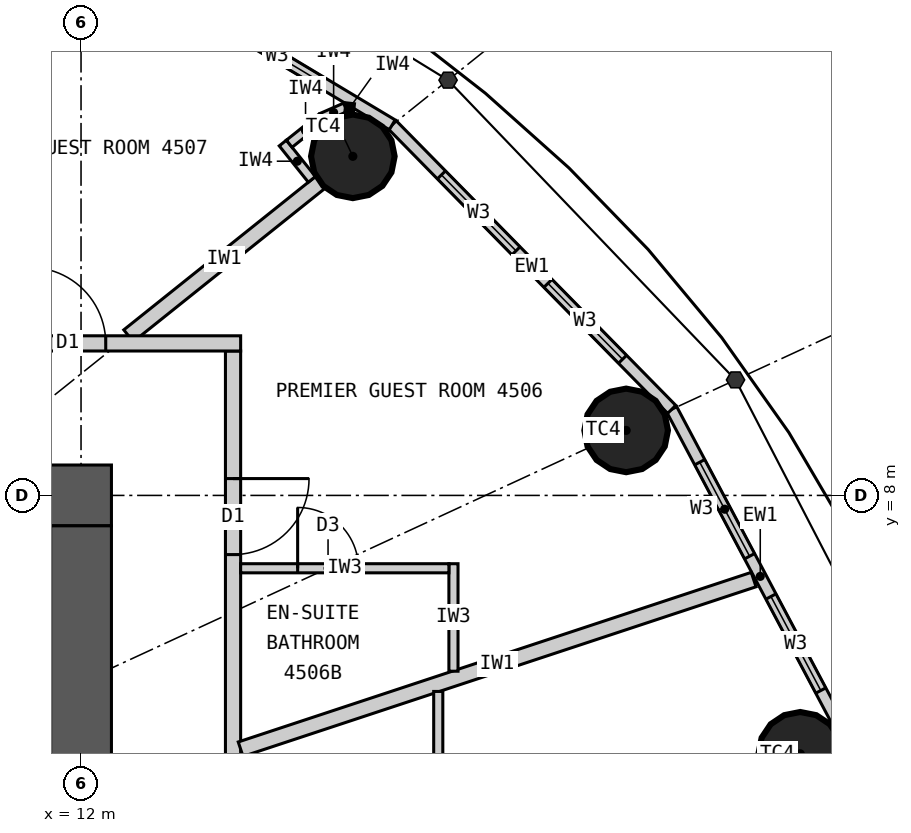
"""IFC4 building model, lengths in metres.
Left out: names, types, materials, properties, quantities, classifications, styles, units other than length and angle.
Written with IfcOpenShell. Run it as: python <this file> out.ifc"""

import sys

from ifc_helpers import new_model, si_unit, direction, frame, frame_2d, origin, origin_2d, place, context, subcontext, project, spatial, rectangle, circle, extrude, element, fill, save


model = new_model("IFC4")
c1 = context("Model", 3, precision=1e-05, world=origin(), true_north=direction((0.0, 1.0)))
c2 = subcontext(c1, "Body", "Model", "MODEL_VIEW")
j1 = project(units=[si_unit("LENGTHUNIT", "METRE"), si_unit("PLANEANGLEUNIT", "RADIAN")], contexts=[c1])
p1 = place(None, origin())
s1 = spatial("IfcSite", under=j1, at=p1, CompositionType="ELEMENT")
p2 = place(p1, origin())
s2 = spatial("IfcBuilding", under=s1, at=p2, CompositionType="ELEMENT")
p3 = place(p2, frame((0.0, 0.0, 169.8)))
s3 = spatial("IfcBuildingStorey", under=s2, at=p3, CompositionType="ELEMENT", Elevation=169.8)
for number, where, z_axis, x_axis in (
    (1, (21.463, 4.601, 0.0), (0.0, 0.0, 1.0), (1.0, 0.0, 0.0)),
    (2, (19.172, 8.855, 0.0), (0.0, 0.0, 1.0), (1.0, 0.0, 0.0)),
    (3, (15.576, 12.461, 0.0), (0.0, 0.0, 1.0), (1.0, 0.0, 0.0)),
):
    element("IfcColumn", number, at=place(p3, frame(where, z_axis=z_axis, x_axis=x_axis)), inside=s3, PredefinedType="COLUMN", context=c2, shape_type="SweptSolid", body=[
        extrude(circle(Radius=0.55, at=origin_2d()), origin(), (0.0, 0.0, 1.0), 3.3),
    ])
p4 = place(p3, frame((-12.4, 8.0, 0.0), z_axis=(0.0, 0.0, 1.0), x_axis=(1.0, 0.0, 0.0)))
e4 = element("IfcWall", 4, at=p4, inside=s3, PredefinedType="SHEAR", context=c2, shape_type="SweptSolid", body=[
    extrude(rectangle(XDim=24.8, YDim=0.8, at=frame_2d((12.4, 0.0))), origin(), (0.0, 0.0, 1.0), 3.3),
])
p5 = place(p4, frame((11.1, 0.0, 0.0)))
e5 = element("IfcOpeningElement", 5, at=p5, cuts=e4, PredefinedType="OPENING", context=c2, shape_type="SweptSolid", body=[
    extrude(rectangle(XDim=1.2, YDim=2.2, at=frame_2d((0.6, 1.1))), frame((0.0, 0.41, 0.0), z_axis=(0.0, -1.0, 0.0), x_axis=(1.0, 0.0, 0.0)), (0.0, 0.0, 1.0), 0.82),
])
p6 = place(p4, frame((18.7, 0.0, 0.0)))
e6 = element("IfcOpeningElement", 6, at=p6, cuts=e4, PredefinedType="OPENING", context=c2, shape_type="SweptSolid", body=[
    extrude(rectangle(XDim=0.9, YDim=2.2, at=frame_2d((0.45, 1.1))), frame((0.0, 0.41, 0.0), z_axis=(0.0, -1.0, 0.0), x_axis=(1.0, 0.0, 0.0)), (0.0, 0.0, 1.0), 0.82),
])
p7 = place(p3, frame((12.0, -7.6, 0.0), z_axis=(0.0, 0.0, 1.0), x_axis=(0.0, 1.0, 0.0)))
e7 = element("IfcWall", 7, at=p7, inside=s3, PredefinedType="SHEAR", context=c2, shape_type="SweptSolid", body=[
    extrude(rectangle(XDim=15.2, YDim=0.8, at=frame_2d((7.6, 0.0))), origin(), (0.0, 0.0, 1.0), 3.3),
])
p8 = place(p7, frame((6.7, 0.0, 0.0)))
e8 = element("IfcOpeningElement", 8, at=p8, cuts=e7, PredefinedType="OPENING", context=c2, shape_type="SweptSolid", body=[
    extrude(rectangle(XDim=1.8, YDim=2.2, at=frame_2d((0.9, 1.1))), frame((0.0, 0.41, 0.0), z_axis=(0.0, -1.0, 0.0), x_axis=(1.0, 0.0, 0.0)), (0.0, 0.0, 1.0), 0.82),
])
p9 = place(p3, frame((22.102, 4.738, 0.0), z_axis=(0.0, 0.0, 1.0), x_axis=(-0.468428906714, 0.883501193748, 0.0)))
e9 = element("IfcWall", 9, at=p9, inside=s3, PredefinedType="ELEMENTEDWALL", context=c2, shape_type="SweptSolid", body=[
    extrude(rectangle(XDim=4.974, YDim=0.15, at=frame_2d((2.487, 0.0))), origin(), (0.0, 0.0, 1.0), 3.12),
])
p10 = place(p9, frame((0.787, 0.0, 0.9)))
e10 = element("IfcOpeningElement", 10, at=p10, cuts=e9, PredefinedType="OPENING", context=c2, shape_type="SweptSolid", body=[
    extrude(rectangle(XDim=1.4, YDim=1.9, at=frame_2d((0.7, 0.95))), frame((0.0, 0.085, 0.0), z_axis=(0.0, -1.0, 0.0), x_axis=(1.0, 0.0, 0.0)), (0.0, 0.0, 1.0), 0.17),
])
p11 = place(p9, frame((2.787, 0.0, 0.9)))
e11 = element("IfcOpeningElement", 11, at=p11, cuts=e9, PredefinedType="OPENING", context=c2, shape_type="SweptSolid", body=[
    extrude(rectangle(XDim=1.4, YDim=1.9, at=frame_2d((0.7, 0.95))), frame((0.0, 0.085, 0.0), z_axis=(0.0, -1.0, 0.0), x_axis=(1.0, 0.0, 0.0)), (0.0, 0.0, 1.0), 0.17),
])
p12 = place(p3, frame((19.772, 9.132, 0.0), z_axis=(0.0, 0.0, 1.0), x_axis=(-0.700727467776, 0.71342905457, 0.0)))
e12 = element("IfcWall", 12, at=p12, inside=s3, PredefinedType="ELEMENTEDWALL", context=c2, shape_type="SweptSolid", body=[
    extrude(rectangle(XDim=5.247, YDim=0.15, at=frame_2d((2.624, 0.0))), origin(), (0.0, 0.0, 1.0), 3.12),
])
p13 = place(p12, frame((0.924, 0.0, 0.9)))
e13 = element("IfcOpeningElement", 13, at=p13, cuts=e12, PredefinedType="OPENING", context=c2, shape_type="SweptSolid", body=[
    extrude(rectangle(XDim=1.4, YDim=1.9, at=frame_2d((0.7, 0.95))), frame((0.0, 0.085, 0.0), z_axis=(0.0, -1.0, 0.0), x_axis=(1.0, 0.0, 0.0)), (0.0, 0.0, 1.0), 0.17),
])
p14 = place(p12, frame((2.924, 0.0, 0.9)))
e14 = element("IfcOpeningElement", 14, at=p14, cuts=e12, PredefinedType="OPENING", context=c2, shape_type="SweptSolid", body=[
    extrude(rectangle(XDim=1.4, YDim=1.9, at=frame_2d((0.7, 0.95))), frame((0.0, 0.085, 0.0), z_axis=(0.0, -1.0, 0.0), x_axis=(1.0, 0.0, 0.0)), (0.0, 0.0, 1.0), 0.17),
])
p15 = place(p3, frame((16.095, 12.876, 0.0), z_axis=(0.0, 0.0, 1.0), x_axis=(-0.857695199231, 0.514158482587, 0.0)))
e15 = element("IfcWall", 15, at=p15, inside=s3, PredefinedType="ELEMENTEDWALL", context=c2, shape_type="SweptSolid", body=[
    extrude(rectangle(XDim=5.536, YDim=0.15, at=frame_2d((2.768, 0.0))), origin(), (0.0, 0.0, 1.0), 3.12),
])
p16 = place(p15, frame((1.068, 0.0, 0.9)))
e16 = element("IfcOpeningElement", 16, at=p16, cuts=e15, PredefinedType="OPENING", context=c2, shape_type="SweptSolid", body=[
    extrude(rectangle(XDim=1.4, YDim=1.9, at=frame_2d((0.7, 0.95))), frame((0.0, 0.085, 0.0), z_axis=(0.0, -1.0, 0.0), x_axis=(1.0, 0.0, 0.0)), (0.0, 0.0, 1.0), 0.17),
])
p17 = place(p15, frame((3.068, 0.0, 0.9)))
e17 = element("IfcOpeningElement", 17, at=p17, cuts=e15, PredefinedType="OPENING", context=c2, shape_type="SweptSolid", body=[
    extrude(rectangle(XDim=1.4, YDim=1.9, at=frame_2d((0.7, 0.95))), frame((0.0, 0.085, 0.0), z_axis=(0.0, -1.0, 0.0), x_axis=(1.0, 0.0, 0.0)), (0.0, 0.0, 1.0), 0.17),
])
p18 = place(p3, frame((14.0, -9.9, 0.0), z_axis=(0.0, 0.0, 1.0), x_axis=(0.0, 1.0, 0.0)))
e18 = element("IfcWall", 18, at=p18, inside=s3, PredefinedType="PARTITIONING", context=c2, shape_type="SweptSolid", body=[
    extrude(rectangle(XDim=19.8, YDim=0.2, at=frame_2d((9.9, 0.0))), origin(), (0.0, 0.0, 1.0), 3.12),
])
p19 = place(p18, frame((3.688, 0.0, 0.0)))
e19 = element("IfcOpeningElement", 19, at=p19, cuts=e18, PredefinedType="OPENING", context=c2, shape_type="SweptSolid", body=[
    extrude(rectangle(XDim=1.0, YDim=2.2, at=frame_2d((0.5, 1.1))), frame((0.0, 0.11, 0.0), z_axis=(0.0, -1.0, 0.0), x_axis=(1.0, 0.0, 0.0)), (0.0, 0.0, 1.0), 0.22),
])
p20 = place(p18, frame((9.979, 0.0, 0.0)))
e20 = element("IfcOpeningElement", 20, at=p20, cuts=e18, PredefinedType="OPENING", context=c2, shape_type="SweptSolid", body=[
    extrude(rectangle(XDim=1.0, YDim=2.2, at=frame_2d((0.5, 1.1))), frame((0.0, 0.11, 0.0), z_axis=(0.0, -1.0, 0.0), x_axis=(1.0, 0.0, 0.0)), (0.0, 0.0, 1.0), 0.22),
])
p21 = place(p18, frame((17.122, 0.0, 0.0)))
e21 = element("IfcOpeningElement", 21, at=p21, cuts=e18, PredefinedType="OPENING", context=c2, shape_type="SweptSolid", body=[
    extrude(rectangle(XDim=1.0, YDim=2.2, at=frame_2d((0.5, 1.1))), frame((0.0, 0.11, 0.0), z_axis=(0.0, -1.0, 0.0), x_axis=(1.0, 0.0, 0.0)), (0.0, 0.0, 1.0), 0.22),
])
p22 = place(p3, frame((14.1, 4.661, 0.0), z_axis=(0.0, 0.0, 1.0), x_axis=(0.949453216399, 0.313908569285, 0.0)))
e22 = element("IfcWall", 22, at=p22, inside=s3, PredefinedType="PARTITIONING", context=c2, shape_type="SweptSolid", body=[
    extrude(rectangle(XDim=7.109, YDim=0.2, at=frame_2d((3.554, 0.0))), origin(), (0.0, 0.0, 1.0), 3.12),
])
p23 = place(p3, frame((12.625, 10.1, 0.0), z_axis=(0.0, 0.0, 1.0), x_axis=(0.780876185034, 0.624685827954, 0.0)))
e23 = element("IfcWall", 23, at=p23, inside=s3, PredefinedType="PARTITIONING", context=c2, shape_type="SweptSolid", body=[
    extrude(rectangle(XDim=3.229, YDim=0.2, at=frame_2d((1.615, 0.0))), origin(), (0.0, 0.0, 1.0), 2.42),
])
p24 = place(p3, frame((16.7, 5.421, 0.0), z_axis=(0.0, 0.0, 1.0), x_axis=(0.0, -1.0, 0.0)))
e24 = element("IfcWall", 24, at=p24, inside=s3, PredefinedType="PARTITIONING", context=c2, shape_type="SweptSolid", body=[
    extrude(rectangle(XDim=3.2, YDim=0.12, at=frame_2d((1.6, 0.0))), origin(), (0.0, 0.0, 1.0), 3.12),
])
p25 = place(p24, frame((1.2, 0.0, 0.0)))
e25 = element("IfcOpeningElement", 25, at=p25, cuts=e24, PredefinedType="OPENING", context=c2, shape_type="SweptSolid", body=[
    extrude(rectangle(XDim=0.8, YDim=2.1, at=frame_2d((0.4, 1.05))), frame((0.0, 0.07, 0.0), z_axis=(0.0, -1.0, 0.0), x_axis=(1.0, 0.0, 0.0)), (0.0, 0.0, 1.0), 0.14),
])
p26 = place(p3, frame((16.9, 5.687, 0.0), z_axis=(0.0, 0.0, 1.0), x_axis=(0.0, 1.0, 0.0)))
e26 = element("IfcWall", 26, at=p26, inside=s3, PredefinedType="PARTITIONING", context=c2, shape_type="SweptSolid", body=[
    extrude(rectangle(XDim=1.414, YDim=0.12, at=frame_2d((0.707, 0.0))), origin(), (0.0, 0.0, 1.0), 3.12),
])
p27 = place(p3, frame((14.1, 7.042, 0.0), z_axis=(0.0, 0.0, 1.0), x_axis=(1.0, 0.0, 0.0)))
e27 = element("IfcWall", 27, at=p27, inside=s3, PredefinedType="PARTITIONING", context=c2, shape_type="SweptSolid", body=[
    extrude(rectangle(XDim=2.74, YDim=0.12, at=frame_2d((1.37, 0.0))), origin(), (0.0, 0.0, 1.0), 3.12),
])
p28 = place(p27, frame((0.75, 0.0, 0.0)))
e28 = element("IfcOpeningElement", 28, at=p28, cuts=e27, PredefinedType="OPENING", context=c2, shape_type="SweptSolid", body=[
    extrude(rectangle(XDim=0.8, YDim=2.1, at=frame_2d((0.4, 1.05))), frame((0.0, 0.07, 0.0), z_axis=(0.0, -1.0, 0.0), x_axis=(1.0, 0.0, 0.0)), (0.0, 0.0, 1.0), 0.14),
])
p29 = place(p3, frame((1.67, 10.0, 0.0), z_axis=(0.0, 0.0, 1.0), x_axis=(1.0, 0.0, 0.0)))
e29 = element("IfcWall", 29, at=p29, inside=s3, PredefinedType="PARTITIONING", context=c2, shape_type="SweptSolid", body=[
    extrude(rectangle(XDim=12.43, YDim=0.2, at=frame_2d((6.215, 0.0))), origin(), (0.0, 0.0, 1.0), 3.12),
])
p30 = place(p29, frame((9.655, 0.0, 0.0)))
e30 = element("IfcOpeningElement", 30, at=p30, cuts=e29, PredefinedType="OPENING", context=c2, shape_type="SweptSolid", body=[
    extrude(rectangle(XDim=1.0, YDim=2.2, at=frame_2d((0.5, 1.1))), frame((0.0, 0.11, 0.0), z_axis=(0.0, -1.0, 0.0), x_axis=(1.0, 0.0, 0.0)), (0.0, 0.0, 1.0), 0.22),
])
p31 = place(p3, frame((15.037, 12.158, 0.0), z_axis=(0.0, 0.0, 1.0), x_axis=(-0.624840920722, 0.78075208856, 0.0)))
e31 = element("IfcWall", 31, at=p31, inside=s3, PredefinedType="PARTITIONING", context=c2, shape_type="SweptSolid", body=[
    extrude(rectangle(XDim=0.612, YDim=0.12, at=frame_2d((0.306, 0.0))), origin(), (0.0, 0.0, 1.0), 3.12),
])
p32 = place(p3, frame((14.739, 12.627, 0.0), z_axis=(0.0, 0.0, 1.0), x_axis=(0.780912119987, 0.624640905527, 0.0)))
e32 = element("IfcWall", 32, at=p32, inside=s3, PredefinedType="PARTITIONING", context=c2, shape_type="SweptSolid", body=[
    extrude(rectangle(XDim=0.55, YDim=0.12, at=frame_2d((0.275, 0.0))), origin(), (0.0, 0.0, 1.0), 3.12),
])
p33 = place(p3, frame((15.169, 12.97, 0.0), z_axis=(0.0, 0.0, 1.0), x_axis=(0.915974725257, 0.401235968838, 0.0)))
e33 = element("IfcWall", 33, at=p33, inside=s3, PredefinedType="PARTITIONING", context=c2, shape_type="SweptSolid", body=[
    extrude(rectangle(XDim=0.338, YDim=0.12, at=frame_2d((0.169, 0.0))), origin(), (0.0, 0.0, 1.0), 3.12),
])
p34 = place(p3, frame((15.478, 13.106, 0.0), z_axis=(0.0, 0.0, 1.0), x_axis=(0.993778813557, -0.111371763588, 0.0)))
e34 = element("IfcWall", 34, at=p34, inside=s3, PredefinedType="PARTITIONING", context=c2, shape_type="SweptSolid", body=[
    extrude(rectangle(XDim=0.114, YDim=0.12, at=frame_2d((0.057, 0.0))), origin(), (0.0, 0.0, 1.0), 3.12),
])
p35 = place(p10, origin())
e35 = element("IfcWindow", 35, at=p35, inside=s3, PartitioningType="SINGLE_PANEL", PredefinedType="WINDOW", context=c2, shape_type="SweptSolid", body=[
    extrude(rectangle(XDim=1.4, YDim=1.9, at=frame_2d((0.7, 0.95))), frame((0.0, 0.03, 0.0), z_axis=(0.0, -1.0, 0.0), x_axis=(1.0, 0.0, 0.0)), (0.0, 0.0, 1.0), 0.06),
])
fill(e10, e35)
p36 = place(p11, origin())
e36 = element("IfcWindow", 36, at=p36, inside=s3, PartitioningType="SINGLE_PANEL", PredefinedType="WINDOW", context=c2, shape_type="SweptSolid", body=[
    extrude(rectangle(XDim=1.4, YDim=1.9, at=frame_2d((0.7, 0.95))), frame((0.0, 0.03, 0.0), z_axis=(0.0, -1.0, 0.0), x_axis=(1.0, 0.0, 0.0)), (0.0, 0.0, 1.0), 0.06),
])
fill(e11, e36)
p37 = place(p13, origin())
e37 = element("IfcWindow", 37, at=p37, inside=s3, PartitioningType="SINGLE_PANEL", PredefinedType="WINDOW", context=c2, shape_type="SweptSolid", body=[
    extrude(rectangle(XDim=1.4, YDim=1.9, at=frame_2d((0.7, 0.95))), frame((0.0, 0.03, 0.0), z_axis=(0.0, -1.0, 0.0), x_axis=(1.0, 0.0, 0.0)), (0.0, 0.0, 1.0), 0.06),
])
fill(e13, e37)
p38 = place(p14, origin())
e38 = element("IfcWindow", 38, at=p38, inside=s3, PartitioningType="SINGLE_PANEL", PredefinedType="WINDOW", context=c2, shape_type="SweptSolid", body=[
    extrude(rectangle(XDim=1.4, YDim=1.9, at=frame_2d((0.7, 0.95))), frame((0.0, 0.03, 0.0), z_axis=(0.0, -1.0, 0.0), x_axis=(1.0, 0.0, 0.0)), (0.0, 0.0, 1.0), 0.06),
])
fill(e14, e38)
p39 = place(p16, origin())
e39 = element("IfcWindow", 39, at=p39, inside=s3, PartitioningType="SINGLE_PANEL", PredefinedType="WINDOW", context=c2, shape_type="SweptSolid", body=[
    extrude(rectangle(XDim=1.4, YDim=1.9, at=frame_2d((0.7, 0.95))), frame((0.0, 0.03, 0.0), z_axis=(0.0, -1.0, 0.0), x_axis=(1.0, 0.0, 0.0)), (0.0, 0.0, 1.0), 0.06),
])
fill(e16, e39)
p40 = place(p28, origin())
e40 = element("IfcDoor", 40, at=p40, inside=s3, OperationType="SINGLE_SWING_LEFT", PredefinedType="DOOR", context=c2, shape_type="SweptSolid", body=[
    extrude(rectangle(XDim=0.8, YDim=2.1, at=frame_2d((0.4, 1.05))), frame((0.0, 0.025, 0.0), z_axis=(0.0, -1.0, 0.0), x_axis=(1.0, 0.0, 0.0)), (0.0, 0.0, 1.0), 0.05),
])
fill(e28, e40)
p41 = place(p21, origin())
e41 = element("IfcDoor", 41, at=p41, inside=s3, OperationType="SINGLE_SWING_RIGHT", PredefinedType="DOOR", context=c2, shape_type="SweptSolid", body=[
    extrude(rectangle(XDim=1.0, YDim=2.2, at=frame_2d((0.5, 1.1))), frame((0.0, 0.025, 0.0), z_axis=(0.0, -1.0, 0.0), x_axis=(1.0, 0.0, 0.0)), (0.0, 0.0, 1.0), 0.05),
])
fill(e21, e41)
p42 = place(p30, origin())
e42 = element("IfcDoor", 42, at=p42, inside=s3, OperationType="SINGLE_SWING_LEFT", PredefinedType="DOOR", context=c2, shape_type="SweptSolid", body=[
    extrude(rectangle(XDim=1.0, YDim=2.2, at=frame_2d((0.5, 1.1))), frame((0.0, 0.025, 0.0), z_axis=(0.0, -1.0, 0.0), x_axis=(1.0, 0.0, 0.0)), (0.0, 0.0, 1.0), 0.05),
])
fill(e30, e42)
save(model, sys.argv[1])
